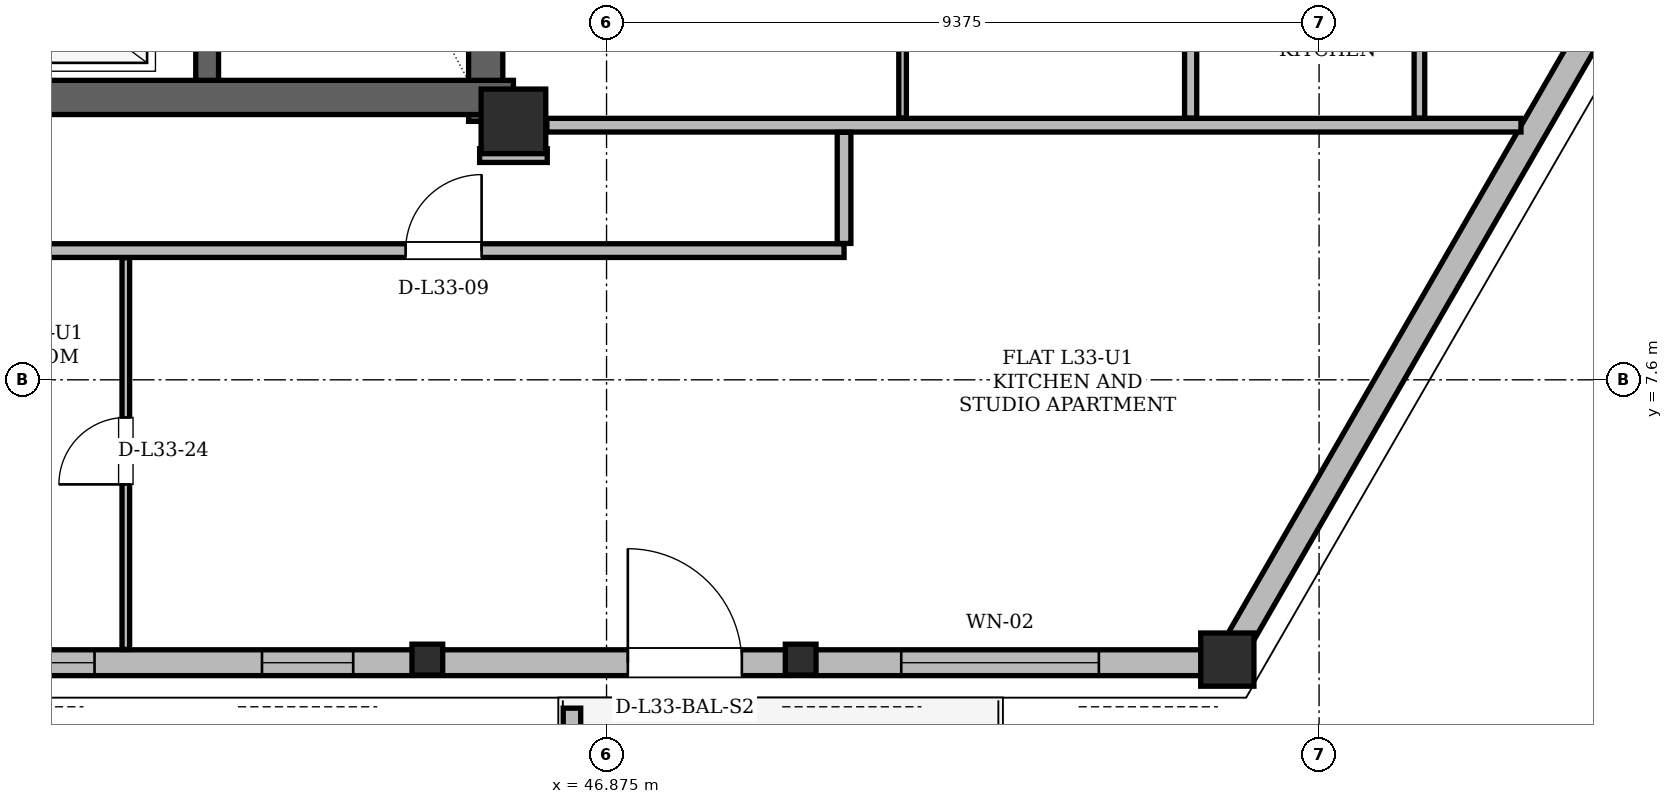
"""IFC4 building model, lengths in metres.
Left out: names, types, materials, properties, quantities, classifications, styles, units other than length and angle.
Written with IfcOpenShell. Run it as: python <this file> out.ifc"""

import sys

from ifc_helpers import new_model, si_unit, direction, frame, frame_2d, origin, origin_2d, place, context, subcontext, project, spatial, polyline, rectangle, hollow_rectangle, i_section, outline, extrude, element, fill, save


model = new_model("IFC4")
c1 = context("Model", 3, precision=1e-05, world=origin(), true_north=direction((0.0, 1.0)))
c2 = subcontext(c1, "Body", "Model", "MODEL_VIEW")
j1 = project(units=[si_unit("LENGTHUNIT", "METRE"), si_unit("PLANEANGLEUNIT", "RADIAN")], contexts=[c1])
p1 = place(None, origin())
s1 = spatial("IfcSite", under=j1, at=p1, CompositionType="ELEMENT")
p2 = place(p1, origin())
s2 = spatial("IfcBuilding", under=s1, at=p2, CompositionType="ELEMENT")
p3 = place(p2, frame((0.0, 0.0, 126.6)))
s3 = spatial("IfcBuildingStorey", under=s2, at=p3, CompositionType="ELEMENT", Elevation=126.6)
p4 = place(p3, frame((45.65, 11.0, 0.0), z_axis=(0.0, 0.0, 1.0), x_axis=(1.0, 0.0, 0.0)))
e1 = element("IfcColumn", 1, at=p4, inside=s3, PredefinedType="COLUMN", context=c2, shape_type="SweptSolid", body=[
    extrude(hollow_rectangle(XDim=0.85, YDim=0.85, WallThickness=0.07, at=origin_2d()), origin(), (0.0, 0.0, 1.0), 3.6),
])
p5 = place(p3, frame((55.024, 3.878, 0.004), z_axis=(0.010126722632, 0.022700170195, 0.999691028149), x_axis=(-0.913246900768, 0.40740655154, 0.0)))
e2 = element("IfcColumn", 2, at=p5, inside=s3, PredefinedType="COLUMN", context=c2, shape_type="SweptSolid", body=[
    extrude(hollow_rectangle(XDim=0.7, YDim=0.7, WallThickness=0.055, at=origin_2d()), origin(), (0.0, 0.0, 1.0), 3.592),
])
for number, where, z_axis, x_axis in (
    (3, (44.51, 3.878, 0.004), (0.004, 0.023, 1.0), (-0.984, 0.177, 0.0)),
    (4, (49.417, 3.878, 0.004), (0.007, 0.023, 1.0), (-0.957, 0.289, 0.0)),
):
    element("IfcColumn", number, at=place(p3, frame(where, z_axis=z_axis, x_axis=x_axis)), inside=s3, PredefinedType="COLUMN", context=c2, shape_type="SweptSolid", body=[
        extrude(i_section(OverallWidth=0.404, OverallDepth=0.406, WebThickness=0.027, FlangeThickness=0.044, at=origin_2d()), origin(), (0.0, 0.0, 1.0), 3.592),
    ])
p6 = place(p3, frame((45.285, 11.0, 0.0), z_axis=(0.0, 0.0, 1.0), x_axis=(0.0, 1.0, 0.0)))
e5 = element("IfcWall", 5, at=p6, inside=s3, PredefinedType="SHEAR", context=c2, shape_type="SweptSolid", body=[
    extrude(rectangle(XDim=13.3, YDim=0.45, at=frame_2d((6.65, 0.0))), origin(), (0.0, 0.0, 1.0), 3.36),
])
p7 = place(p3, frame((38.55, 11.315, 0.0), z_axis=(0.0, 0.0, 1.0), x_axis=(1.0, 0.0, 0.0)))
e6 = element("IfcWall", 6, at=p7, inside=s3, PredefinedType="SHEAR", context=c2, shape_type="SweptSolid", body=[
    extrude(rectangle(XDim=7.1, YDim=0.45, at=frame_2d((3.55, 0.0))), origin(), (0.0, 0.0, 1.0), 3.36),
])
p8 = place(p3, frame((41.62, 11.54, 0.0), z_axis=(0.0, 0.0, 1.0), x_axis=(0.0, 1.0, 0.0)))
e7 = element("IfcWall", 7, at=p8, inside=s3, PredefinedType="SHEAR", context=c2, shape_type="SweptSolid", body=[
    extrude(rectangle(XDim=7.62, YDim=0.3, at=frame_2d((3.81, 0.0))), origin(), (0.0, 0.0, 1.0), 3.36),
])
p9 = place(p3, frame((19.976, 3.878, 0.0), z_axis=(0.0, 0.0, 1.0), x_axis=(1.0, 0.0, 0.0)))
e8 = element("IfcWall", 8, at=p9, inside=s3, PredefinedType="SOLIDWALL", context=c2, shape_type="SweptSolid", body=[
    extrude(rectangle(XDim=35.049, YDim=0.34, at=frame_2d((17.524, 0.0))), origin(), (0.0, 0.0, 1.0), 2.578),
])
p10 = place(p9, frame((8.244, 0.0, 0.0)))
e9 = element("IfcOpeningElement", 9, at=p10, cuts=e8, PredefinedType="OPENING", context=c2, shape_type="SweptSolid", body=[
    extrude(rectangle(XDim=1.5, YDim=2.2, at=frame_2d((0.75, 1.1))), frame((0.0, 0.17, 0.0), z_axis=(0.0, -1.0, 0.0), x_axis=(1.0, 0.0, 0.0)), (0.0, 0.0, 1.0), 0.34),
])
p11 = place(p9, frame((27.18, 0.0, 0.0)))
e10 = element("IfcOpeningElement", 10, at=p11, cuts=e8, PredefinedType="OPENING", context=c2, shape_type="SweptSolid", body=[
    extrude(rectangle(XDim=1.5, YDim=2.2, at=frame_2d((0.75, 1.1))), frame((0.0, 0.17, 0.0), z_axis=(0.0, -1.0, 0.0), x_axis=(1.0, 0.0, 0.0)), (0.0, 0.0, 1.0), 0.34),
])
p12 = place(p9, frame((13.719, 0.0, 0.85)))
e11 = element("IfcOpeningElement", 11, at=p12, cuts=e8, PredefinedType="OPENING", context=c2, shape_type="SweptSolid", body=[
    extrude(rectangle(XDim=1.2, YDim=1.48, at=frame_2d((0.6, 0.74))), frame((0.0, 0.17, 0.0), z_axis=(0.0, -1.0, 0.0), x_axis=(1.0, 0.0, 0.0)), (0.0, 0.0, 1.0), 0.34),
])
p13 = place(p9, frame((16.551, 0.0, 0.85)))
e12 = element("IfcOpeningElement", 12, at=p13, cuts=e8, PredefinedType="OPENING", context=c2, shape_type="SweptSolid", body=[
    extrude(rectangle(XDim=1.2, YDim=1.48, at=frame_2d((0.6, 0.74))), frame((0.0, 0.17, 0.0), z_axis=(0.0, -1.0, 0.0), x_axis=(1.0, 0.0, 0.0)), (0.0, 0.0, 1.0), 0.34),
])
p14 = place(p9, frame((22.366, 0.0, 0.85)))
e13 = element("IfcOpeningElement", 13, at=p14, cuts=e8, PredefinedType="OPENING", context=c2, shape_type="SweptSolid", body=[
    extrude(rectangle(XDim=1.2, YDim=1.48, at=frame_2d((0.6, 0.74))), frame((0.0, 0.17, 0.0), z_axis=(0.0, -1.0, 0.0), x_axis=(1.0, 0.0, 0.0)), (0.0, 0.0, 1.0), 0.34),
])
p15 = place(p9, frame((30.777, 0.0, 0.85)))
e14 = element("IfcOpeningElement", 14, at=p15, cuts=e8, PredefinedType="OPENING", context=c2, shape_type="SweptSolid", body=[
    extrude(rectangle(XDim=2.6, YDim=1.618, at=frame_2d((1.3, 0.809))), frame((0.0, 0.17, 0.0), z_axis=(0.0, -1.0, 0.0), x_axis=(1.0, 0.0, 0.0)), (0.0, 0.0, 1.0), 0.34),
])
p16 = place(p9, frame((18.963, 0.0, 0.85)))
e15 = element("IfcOpeningElement", 15, at=p16, cuts=e8, PredefinedType="OPENING", context=c2, shape_type="SweptSolid", body=[
    extrude(rectangle(XDim=1.2, YDim=1.48, at=frame_2d((0.6, 0.74))), frame((0.0, 0.17, 0.0), z_axis=(0.0, -1.0, 0.0), x_axis=(1.0, 0.0, 0.0)), (0.0, 0.0, 1.0), 0.34),
])
p17 = place(p9, frame((2.329, 0.0, 0.85)))
e16 = element("IfcOpeningElement", 16, at=p17, cuts=e8, PredefinedType="OPENING", context=c2, shape_type="SweptSolid", body=[
    extrude(rectangle(XDim=1.2, YDim=1.48, at=frame_2d((0.6, 0.74))), frame((0.0, 0.17, 0.0), z_axis=(0.0, -1.0, 0.0), x_axis=(1.0, 0.0, 0.0)), (0.0, 0.0, 1.0), 0.34),
])
p18 = place(p9, frame((11.38, 0.0, 0.85)))
e17 = element("IfcOpeningElement", 17, at=p18, cuts=e8, PredefinedType="OPENING", context=c2, shape_type="SweptSolid", body=[
    extrude(rectangle(XDim=1.6, YDim=1.618, at=frame_2d((0.8, 0.809))), frame((0.0, 0.17, 0.0), z_axis=(0.0, -1.0, 0.0), x_axis=(1.0, 0.0, 0.0)), (0.0, 0.0, 1.0), 0.34),
])
p19 = place(p3, frame((55.024, 3.878, 0.0), z_axis=(0.0, 0.0, 1.0), x_axis=(0.500003640647, 0.866023301845, 0.0)))
e18 = element("IfcWall", 18, at=p19, inside=s3, PredefinedType="SOLIDWALL", context=c2, shape_type="SweptSolid", body=[
    extrude(rectangle(XDim=10.572, YDim=0.34, at=frame_2d((5.286, 0.0))), origin(), (0.0, 0.0, 1.0), 2.578),
])
p20 = place(p3, frame((46.42, 3.28, 0.0), z_axis=(0.0, 0.0, 1.0), x_axis=(0.0, -1.0, 0.0)))
e19 = element("IfcWall", 19, at=p20, inside=s3, PredefinedType="PARAPET", context=c2, shape_type="SweptSolid", body=[
    extrude(outline(polyline([(0.0, 0.0), (2.042, 0.0), (2.042, 1.1), (0.0, 1.32), (0.0, 0.0)])), frame((0.0, 0.115, 0.0), z_axis=(0.0, -1.0, 0.0), x_axis=(1.0, 0.0, 0.0)), (0.0, 0.0, 1.0), 0.23),
])
p21 = place(p3, frame((19.6, 9.3, 0.0), z_axis=(0.0, 0.0, 1.0), x_axis=(1.0, 0.0, 0.0)))
e20 = element("IfcWall", 20, at=p21, inside=s3, PredefinedType="PARTITIONING", context=c2, shape_type="SweptSolid", body=[
    extrude(rectangle(XDim=30.4, YDim=0.18, at=frame_2d((15.2, 0.0))), origin(), (0.0, 0.0, 1.0), 2.814),
])
p22 = place(p21, frame((6.121, 0.0, 0.0)))
e21 = element("IfcOpeningElement", 21, at=p22, cuts=e20, PredefinedType="OPENING", context=c2, shape_type="SweptSolid", body=[
    extrude(rectangle(XDim=1.0, YDim=2.18, at=frame_2d((0.5, 1.09))), frame((0.0, 0.09, 0.0), z_axis=(0.0, -1.0, 0.0), x_axis=(1.0, 0.0, 0.0)), (0.0, 0.0, 1.0), 0.18),
])
p23 = place(p21, frame((15.05, 0.0, 0.0)))
e22 = element("IfcOpeningElement", 22, at=p23, cuts=e20, PredefinedType="OPENING", context=c2, shape_type="SweptSolid", body=[
    extrude(rectangle(XDim=1.3, YDim=2.2, at=frame_2d((0.65, 1.1))), frame((0.0, 0.09, 0.0), z_axis=(0.0, -1.0, 0.0), x_axis=(1.0, 0.0, 0.0)), (0.0, 0.0, 1.0), 0.18),
])
p24 = place(p21, frame((24.631, 0.0, 0.0)))
e23 = element("IfcOpeningElement", 23, at=p24, cuts=e20, PredefinedType="OPENING", context=c2, shape_type="SweptSolid", body=[
    extrude(rectangle(XDim=1.0, YDim=2.18, at=frame_2d((0.5, 1.09))), frame((0.0, 0.09, 0.0), z_axis=(0.0, -1.0, 0.0), x_axis=(1.0, 0.0, 0.0)), (0.0, 0.0, 1.0), 0.18),
])
p25 = place(p3, frame((45.205, 10.55, 0.0), z_axis=(0.0, 0.0, 1.0), x_axis=(1.0, 0.0, 0.0)))
e24 = element("IfcWall", 24, at=p25, inside=s3, PredefinedType="PARTITIONING", context=c2, shape_type="SweptSolid", body=[
    extrude(rectangle(XDim=0.89, YDim=0.18, at=frame_2d((0.445, 0.0))), origin(), (0.0, 0.0, 1.0), 3.36),
])
p26 = place(p3, frame((46.09, 10.95, 0.0), z_axis=(0.0, 0.0, 1.0), x_axis=(1.0, 0.0, 0.0)))
e25 = element("IfcWall", 25, at=p26, inside=s3, PredefinedType="PARTITIONING", context=c2, shape_type="SweptSolid", body=[
    extrude(rectangle(XDim=12.816, YDim=0.18, at=frame_2d((6.408, 0.0))), origin(), (0.0, 0.0, 1.0), 2.814),
])
p27 = place(p3, frame((40.55, 4.052, 0.0), z_axis=(0.0, 0.0, 1.0), x_axis=(0.0, 1.0, 0.0)))
e26 = element("IfcWall", 26, at=p27, inside=s3, PredefinedType="PARTITIONING", context=c2, shape_type="SweptSolid", body=[
    extrude(rectangle(XDim=5.154, YDim=0.1, at=frame_2d((2.577, 0.0))), origin(), (0.0, 0.0, 1.0), 3.36),
])
p28 = place(p27, frame((2.172, 0.0, 0.0)))
e27 = element("IfcOpeningElement", 27, at=p28, cuts=e26, PredefinedType="OPENING", context=c2, shape_type="SweptSolid", body=[
    extrude(rectangle(XDim=0.88, YDim=2.08, at=frame_2d((0.44, 1.04))), frame((0.0, 0.05, 0.0), z_axis=(0.0, -1.0, 0.0), x_axis=(1.0, 0.0, 0.0)), (0.0, 0.0, 1.0), 0.1),
])
p29 = place(p3, frame((50.0, 9.394, 0.0), z_axis=(0.0, 0.0, 1.0), x_axis=(0.0, 1.0, 0.0)))
e28 = element("IfcWall", 28, at=p29, inside=s3, PredefinedType="PARTITIONING", context=c2, shape_type="SweptSolid", body=[
    extrude(rectangle(XDim=1.462, YDim=0.18, at=frame_2d((0.731, 0.0))), origin(), (0.0, 0.0, 1.0), 3.36),
])
p30 = place(p3, frame((50.77, 11.044, 0.0), z_axis=(0.0, 0.0, 1.0), x_axis=(0.0, 1.0, 0.0)))
e29 = element("IfcWall", 29, at=p30, inside=s3, PredefinedType="PARTITIONING", context=c2, shape_type="SweptSolid", body=[
    extrude(rectangle(XDim=3.082, YDim=0.1, at=frame_2d((1.541, 0.0))), origin(), (0.0, 0.0, 1.0), 2.814),
])
p31 = place(p3, frame((54.56, 11.044, 0.0), z_axis=(0.0, 0.0, 1.0), x_axis=(0.0, 1.0, 0.0)))
e30 = element("IfcWall", 30, at=p31, inside=s3, PredefinedType="PARTITIONING", context=c2, shape_type="SweptSolid", body=[
    extrude(rectangle(XDim=3.082, YDim=0.16, at=frame_2d((1.541, 0.0))), origin(), (0.0, 0.0, 1.0), 2.814),
])
p32 = place(p3, frame((57.57, 11.044, 0.0), z_axis=(0.0, 0.0, 1.0), x_axis=(0.0, 1.0, 0.0)))
e31 = element("IfcWall", 31, at=p32, inside=s3, PredefinedType="PARTITIONING", context=c2, shape_type="SweptSolid", body=[
    extrude(rectangle(XDim=3.082, YDim=0.14, at=frame_2d((1.541, 0.0))), origin(), (0.0, 0.0, 1.0), 2.814),
])
p33 = place(p11, origin())
e32 = element("IfcDoor", 32, at=p33, inside=s3, OperationType="SINGLE_SWING_LEFT", PredefinedType="DOOR", context=c2, shape_type="SweptSolid", body=[
    extrude(rectangle(XDim=1.5, YDim=2.2, at=frame_2d((0.75, 1.1))), frame((0.0, 0.025, 0.0), z_axis=(0.0, -1.0, 0.0), x_axis=(1.0, 0.0, 0.0)), (0.0, 0.0, 1.0), 0.05),
])
fill(e10, e32)
p34 = place(p14, origin())
e33 = element("IfcWindow", 33, at=p34, inside=s3, PartitioningType="SINGLE_PANEL", PredefinedType="WINDOW", context=c2, shape_type="SweptSolid", body=[
    extrude(rectangle(XDim=1.2, YDim=1.48, at=frame_2d((0.6, 0.74))), frame((0.0, 0.03, 0.0), z_axis=(0.0, -1.0, 0.0), x_axis=(1.0, 0.0, 0.0)), (0.0, 0.0, 1.0), 0.06),
])
fill(e13, e33)
p35 = place(p15, origin())
e34 = element("IfcWindow", 34, at=p35, inside=s3, PartitioningType="SINGLE_PANEL", PredefinedType="WINDOW", context=c2, shape_type="SweptSolid", body=[
    extrude(rectangle(XDim=2.6, YDim=1.618, at=frame_2d((1.3, 0.809))), frame((0.0, 0.03, 0.0), z_axis=(0.0, -1.0, 0.0), x_axis=(1.0, 0.0, 0.0)), (0.0, 0.0, 1.0), 0.06),
])
fill(e14, e34)
p36 = place(p16, origin())
e35 = element("IfcWindow", 35, at=p36, inside=s3, PartitioningType="SINGLE_PANEL", PredefinedType="WINDOW", context=c2, shape_type="SweptSolid", body=[
    extrude(rectangle(XDim=1.2, YDim=1.48, at=frame_2d((0.6, 0.74))), frame((0.0, 0.03, 0.0), z_axis=(0.0, -1.0, 0.0), x_axis=(1.0, 0.0, 0.0)), (0.0, 0.0, 1.0), 0.06),
])
fill(e15, e35)
p37 = place(p24, origin())
e36 = element("IfcDoor", 36, at=p37, inside=s3, OperationType="SINGLE_SWING_RIGHT", PredefinedType="DOOR", context=c2, shape_type="SweptSolid", body=[
    extrude(rectangle(XDim=1.0, YDim=2.18, at=frame_2d((0.5, 1.09))), frame((0.0, 0.025, 0.0), z_axis=(0.0, -1.0, 0.0), x_axis=(1.0, 0.0, 0.0)), (0.0, 0.0, 1.0), 0.05),
])
fill(e23, e36)
p38 = place(p28, origin())
e37 = element("IfcDoor", 37, at=p38, inside=s3, OperationType="SINGLE_SWING_LEFT", PredefinedType="DOOR", context=c2, shape_type="SweptSolid", body=[
    extrude(rectangle(XDim=0.88, YDim=2.08, at=frame_2d((0.44, 1.04))), frame((0.0, 0.025, 0.0), z_axis=(0.0, -1.0, 0.0), x_axis=(1.0, 0.0, 0.0)), (0.0, 0.0, 1.0), 0.05),
])
fill(e27, e37)
save(model, sys.argv[1])
